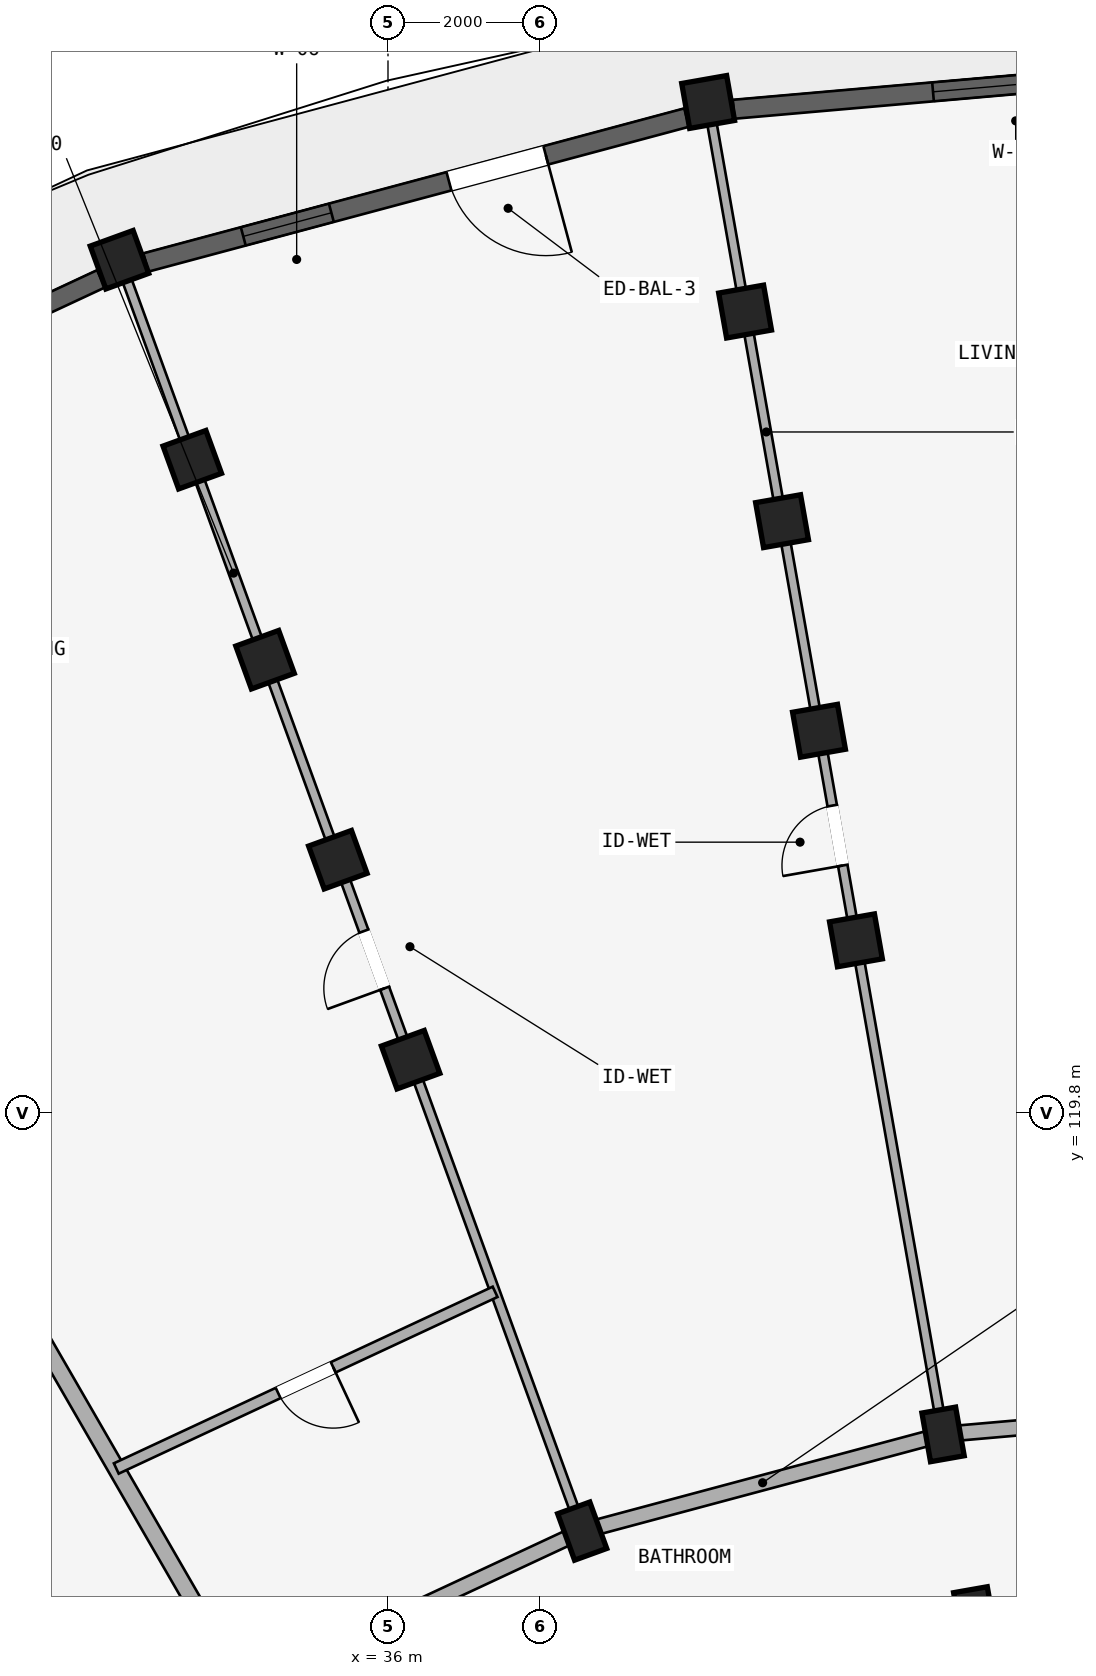
"""IFC4 building model, lengths in metres.
Left out: names, types, materials, properties, quantities, classifications, styles, units other than length and angle.
Written with IfcOpenShell. Run it as: python <this file> out.ifc"""

import sys

from ifc_helpers import new_model, si_unit, direction, frame, frame_2d, origin, origin_2d, place, context, subcontext, project, spatial, rectangle, extrude, element, fill, save


model = new_model("IFC4")
c1 = context("Model", 3, precision=1e-05, world=origin(), true_north=direction((0.0, 1.0)))
c2 = subcontext(c1, "Body", "Model", "MODEL_VIEW")
j1 = project(units=[si_unit("LENGTHUNIT", "METRE"), si_unit("PLANEANGLEUNIT", "RADIAN")], contexts=[c1])
p1 = place(None, origin())
s1 = spatial("IfcSite", under=j1, at=p1, CompositionType="ELEMENT")
p2 = place(p1, origin())
s2 = spatial("IfcBuilding", under=s1, at=p2, CompositionType="ELEMENT")
p3 = place(p2, frame((0.0, 0.0, 33.9)))
s3 = spatial("IfcBuildingStorey", under=s2, at=p3, CompositionType="ELEMENT", Elevation=33.9)
for number, where, z_axis, x_axis in (
    (1, (43.72, 113.208, 0.0), (0.0, 0.0, 1.0), (0.985, 0.174, 0.0)),
    (2, (43.303, 115.572, 0.0), (0.0, 0.0, 1.0), (0.985, 0.174, 0.0)),
):
    element("IfcColumn", number, at=place(p3, frame(where, z_axis=z_axis, x_axis=x_axis)), inside=s3, PredefinedType="COLUMN", context=c2, shape_type="SweptSolid", body=[
        extrude(rectangle(XDim=0.45, YDim=0.65, at=origin_2d()), origin(), (0.0, 0.0, 1.0), 2.93),
    ])
for number, where, z_axis, x_axis in (
    (3, (42.157, 122.071, 0.0), (0.0, 0.0, 1.0), (0.985, 0.174, 0.0)),
    (4, (41.671, 124.829, 0.0), (0.0, 0.0, 1.0), (0.985, 0.174, 0.0)),
    (5, (41.185, 127.586, 0.0), (0.0, 0.0, 1.0), (0.985, 0.174, 0.0)),
    (6, (40.698, 130.344, 0.0), (0.0, 0.0, 1.0), (0.985, 0.174, 0.0)),
    (7, (40.212, 133.101, 0.0), (0.0, 0.0, 1.0), (0.985, 0.174, 0.0)),
):
    element("IfcColumn", number, at=place(p3, frame(where, z_axis=z_axis, x_axis=x_axis)), inside=s3, PredefinedType="COLUMN", context=c2, shape_type="SweptSolid", body=[
        extrude(rectangle(XDim=0.6, YDim=0.6, at=origin_2d()), origin(), (0.0, 0.0, 1.0), 2.93),
    ])
p4 = place(p3, frame((38.555, 114.299, 0.0), z_axis=(0.0, 0.0, 1.0), x_axis=(0.939692620786, 0.342020143326, 0.0)))
e8 = element("IfcColumn", 8, at=p4, inside=s3, PredefinedType="COLUMN", context=c2, shape_type="SweptSolid", body=[
    extrude(rectangle(XDim=0.45, YDim=0.65, at=origin_2d()), origin(), (0.0, 0.0, 1.0), 2.93),
])
for number, where, z_axis, x_axis in (
    (9, (36.298, 120.501, 0.0), (0.0, 0.0, 1.0), (0.94, 0.342, 0.0)),
    (10, (35.34, 123.132, 0.0), (0.0, 0.0, 1.0), (0.94, 0.342, 0.0)),
    (11, (34.382, 125.764, 0.0), (0.0, 0.0, 1.0), (0.94, 0.342, 0.0)),
    (12, (33.425, 128.395, 0.0), (0.0, 0.0, 1.0), (0.94, 0.342, 0.0)),
    (13, (32.467, 131.026, 0.0), (0.0, 0.0, 1.0), (0.94, 0.342, 0.0)),
):
    element("IfcColumn", number, at=place(p3, frame(where, z_axis=z_axis, x_axis=x_axis)), inside=s3, PredefinedType="COLUMN", context=c2, shape_type="SweptSolid", body=[
        extrude(rectangle(XDim=0.6, YDim=0.6, at=origin_2d()), origin(), (0.0, 0.0, 1.0), 2.93),
    ])
p5 = place(p3, frame((48.2, 113.6, 0.0), z_axis=(0.0, 0.0, 1.0), x_axis=(-0.996191949488, -0.087187153726, 0.0)))
e14 = element("IfcWall", 14, at=p5, inside=s3, PredefinedType="STANDARD", context=c2, shape_type="SweptSolid", body=[
    extrude(rectangle(XDim=4.497, YDim=0.2, at=frame_2d((2.249, 0.0))), origin(), (0.0, 0.0, 1.0), 2.372),
])
p6 = place(p5, frame((1.729, 0.0, 0.0)))
e15 = element("IfcOpeningElement", 15, at=p6, cuts=e14, PredefinedType="OPENING", context=c2, shape_type="SweptSolid", body=[
    extrude(rectangle(XDim=1.04, YDim=2.15, at=frame_2d((0.52, 1.075))), frame((0.0, 0.11, 0.0), z_axis=(0.0, -1.0, 0.0), x_axis=(1.0, 0.0, 0.0)), (0.0, 0.0, 1.0), 0.22),
])
p7 = place(p3, frame((48.2, 116.0, 0.0), z_axis=(0.0, 0.0, 1.0), x_axis=(-0.996193663584, -0.087167566415, 0.0)))
e16 = element("IfcWall", 16, at=p7, inside=s3, PredefinedType="STANDARD", context=c2, shape_type="SweptSolid", body=[
    extrude(rectangle(XDim=4.916, YDim=0.2, at=frame_2d((2.458, 0.0))), origin(), (0.0, 0.0, 1.0), 2.372),
])
p8 = place(p7, frame((1.958, 0.0, 0.0)))
e17 = element("IfcOpeningElement", 17, at=p8, cuts=e16, PredefinedType="OPENING", context=c2, shape_type="SweptSolid", body=[
    extrude(rectangle(XDim=1.0, YDim=2.15, at=frame_2d((0.5, 1.075))), frame((0.0, 0.11, 0.0), z_axis=(0.0, -1.0, 0.0), x_axis=(1.0, 0.0, 0.0)), (0.0, 0.0, 1.0), 0.22),
])
p9 = place(p3, frame((43.303, 115.572, 0.0), z_axis=(0.0, 0.0, 1.0), x_axis=(-0.965930095386, -0.258803112091, 0.0)))
e18 = element("IfcWall", 18, at=p9, inside=s3, PredefinedType="STANDARD", context=c2, shape_type="SweptSolid", body=[
    extrude(rectangle(XDim=4.916, YDim=0.2, at=frame_2d((2.458, 0.0))), origin(), (0.0, 0.0, 1.0), 2.372),
])
p10 = place(p3, frame((38.555, 114.299, 0.0), z_axis=(0.0, 0.0, 1.0), x_axis=(-0.906302381024, -0.422629854778, 0.0)))
e19 = element("IfcWall", 19, at=p10, inside=s3, PredefinedType="STANDARD", context=c2, shape_type="SweptSolid", body=[
    extrude(rectangle(XDim=4.915, YDim=0.2, at=frame_2d((2.458, 0.0))), origin(), (0.0, 0.0, 1.0), 2.372),
])
p11 = place(p3, frame((43.286, 115.67, 0.0), z_axis=(0.0, 0.0, 1.0), x_axis=(-0.173646216546, 0.984808098809, 0.0)))
e20 = element("IfcWall", 20, at=p11, inside=s3, PredefinedType="PARTITIONING", context=c2, shape_type="SweptSolid", body=[
    extrude(rectangle(XDim=17.42, YDim=0.125, at=frame_2d((8.71, 0.0))), origin(), (0.0, 0.0, 1.0), 2.372),
])
p12 = place(p11, frame((7.5, 0.0, 0.0)))
e21 = element("IfcOpeningElement", 21, at=p12, cuts=e20, PredefinedType="OPENING", context=c2, shape_type="SweptSolid", body=[
    extrude(rectangle(XDim=0.8, YDim=2.1, at=frame_2d((0.4, 1.05))), frame((0.0, 0.073, 0.0), z_axis=(0.0, -1.0, 0.0), x_axis=(1.0, 0.0, 0.0)), (0.0, 0.0, 1.0), 0.145),
])
p13 = place(p3, frame((38.521, 114.393, 0.0), z_axis=(0.0, 0.0, 1.0), x_axis=(-0.342022120477, 0.939691901159, 0.0)))
e22 = element("IfcWall", 22, at=p13, inside=s3, PredefinedType="PARTITIONING", context=c2, shape_type="SweptSolid", body=[
    extrude(rectangle(XDim=17.42, YDim=0.125, at=frame_2d((8.71, 0.0))), origin(), (0.0, 0.0, 1.0), 2.372),
])
p14 = place(p13, frame((7.5, 0.0, 0.0)))
e23 = element("IfcOpeningElement", 23, at=p14, cuts=e22, PredefinedType="OPENING", context=c2, shape_type="SweptSolid", body=[
    extrude(rectangle(XDim=0.8, YDim=2.1, at=frame_2d((0.4, 1.05))), frame((0.0, 0.073, 0.0), z_axis=(0.0, -1.0, 0.0), x_axis=(1.0, 0.0, 0.0)), (0.0, 0.0, 1.0), 0.145),
])
p15 = place(p3, frame((34.05, 112.309, 0.0), z_axis=(0.0, 0.0, 1.0), x_axis=(-0.499997843263, 0.866026648973, 0.0)))
e24 = element("IfcWall", 24, at=p15, inside=s3, PredefinedType="STANDARD", context=c2, shape_type="SweptSolid", body=[
    extrude(rectangle(XDim=17.42, YDim=0.22, at=frame_2d((8.71, 0.0))), origin(), (0.0, 0.0, 1.0), 2.372),
])
p16 = place(p3, frame((37.409, 117.447, 0.0), z_axis=(0.0, 0.0, 1.0), x_axis=(-0.906302189986, -0.422630264446, 0.0)))
e25 = element("IfcWall", 25, at=p16, inside=s3, PredefinedType="PLUMBINGWALL", context=c2, shape_type="SweptSolid", body=[
    extrude(rectangle(XDim=5.5, YDim=0.15, at=frame_2d((2.75, 0.0))), origin(), (0.0, 0.0, 1.0), 2.372),
])
p17 = place(p16, frame((2.35, 0.0, 0.0)))
e26 = element("IfcOpeningElement", 26, at=p17, cuts=e25, PredefinedType="OPENING", context=c2, shape_type="SweptSolid", body=[
    extrude(rectangle(XDim=0.8, YDim=2.1, at=frame_2d((0.4, 1.05))), frame((0.0, 0.085, 0.0), z_axis=(0.0, -1.0, 0.0), x_axis=(1.0, 0.0, 0.0)), (0.0, 0.0, 1.0), 0.17),
])
p18 = place(p3, frame((47.886, 133.647, 0.0), z_axis=(0.0, 0.0, 1.0), x_axis=(-0.996197565379, -0.087122963287, 0.0)))
e27 = element("IfcWall", 27, at=p18, inside=s3, PredefinedType="STANDARD", context=c2, shape_type="SweptSolid", body=[
    extrude(rectangle(XDim=7.367, YDim=0.25, at=frame_2d((3.684, 0.0))), origin(), (0.0, 0.0, 1.0), 2.472),
])
p19 = place(p18, frame((2.634, 0.0, 0.472)))
e28 = element("IfcOpeningElement", 28, at=p19, cuts=e27, PredefinedType="OPENING", context=c2, shape_type="SweptSolid", body=[
    extrude(rectangle(XDim=2.1, YDim=1.8, at=frame_2d((1.05, 0.9))), frame((0.0, 0.135, 0.0), z_axis=(0.0, -1.0, 0.0), x_axis=(1.0, 0.0, 0.0)), (0.0, 0.0, 1.0), 0.27),
])
p20 = place(p3, frame((39.93, 132.896, 0.0), z_axis=(0.0, 0.0, 1.0), x_axis=(-0.965925122991, -0.258821669831, 0.0)))
e29 = element("IfcWall", 29, at=p20, inside=s3, PredefinedType="STANDARD", context=c2, shape_type="SweptSolid", body=[
    extrude(rectangle(XDim=7.367, YDim=0.25, at=frame_2d((3.684, 0.0))), origin(), (0.0, 0.0, 1.0), 2.472),
])
p21 = place(p20, frame((4.84, 0.0, 0.422)))
e30 = element("IfcOpeningElement", 30, at=p21, cuts=e29, PredefinedType="OPENING", context=c2, shape_type="SweptSolid", body=[
    extrude(rectangle(XDim=1.2, YDim=1.5, at=frame_2d((0.6, 0.75))), frame((0.0, 0.135, 0.0), z_axis=(0.0, -1.0, 0.0), x_axis=(1.0, 0.0, 0.0)), (0.0, 0.0, 1.0), 0.27),
])
p22 = place(p20, frame((1.918, 0.0, 0.0)))
e31 = element("IfcOpeningElement", 31, at=p22, cuts=e29, PredefinedType="OPENING", context=c2, shape_type="SweptSolid", body=[
    extrude(rectangle(XDim=1.32, YDim=2.15, at=frame_2d((0.66, 1.075))), frame((0.0, 0.135, 0.0), z_axis=(0.0, -1.0, 0.0), x_axis=(1.0, 0.0, 0.0)), (0.0, 0.0, 1.0), 0.27),
])
p23 = place(p3, frame((32.225, 130.775, 0.0), z_axis=(0.0, 0.0, 1.0), x_axis=(-0.906321090675, -0.422589730823, 0.0)))
e32 = element("IfcWall", 32, at=p23, inside=s3, PredefinedType="STANDARD", context=c2, shape_type="SweptSolid", body=[
    extrude(rectangle(XDim=7.367, YDim=0.25, at=frame_2d((3.684, 0.0))), origin(), (0.0, 0.0, 1.0), 2.472),
])
p24 = place(p23, frame((2.783, 0.0, 0.622)))
e33 = element("IfcOpeningElement", 33, at=p24, cuts=e32, PredefinedType="OPENING", context=c2, shape_type="SweptSolid", body=[
    extrude(rectangle(XDim=1.8, YDim=1.65, at=frame_2d((0.9, 0.825))), frame((0.0, 0.135, 0.0), z_axis=(0.0, -1.0, 0.0), x_axis=(1.0, 0.0, 0.0)), (0.0, 0.0, 1.0), 0.27),
])
p25 = place(p19, origin())
e34 = element("IfcWindow", 34, at=p25, inside=s3, PartitioningType="TRIPLE_PANEL_VERTICAL", PredefinedType="WINDOW", context=c2, shape_type="SweptSolid", body=[
    extrude(rectangle(XDim=2.1, YDim=1.8, at=frame_2d((1.05, 0.9))), frame((0.0, 0.03, 0.0), z_axis=(0.0, -1.0, 0.0), x_axis=(1.0, 0.0, 0.0)), (0.0, 0.0, 1.0), 0.06),
])
fill(e28, e34)
p26 = place(p21, origin())
e35 = element("IfcWindow", 35, at=p26, inside=s3, PartitioningType="SINGLE_PANEL", PredefinedType="WINDOW", context=c2, shape_type="SweptSolid", body=[
    extrude(rectangle(XDim=1.2, YDim=1.5, at=frame_2d((0.6, 0.75))), frame((0.0, 0.03, 0.0), z_axis=(0.0, -1.0, 0.0), x_axis=(1.0, 0.0, 0.0)), (0.0, 0.0, 1.0), 0.06),
])
fill(e30, e35)
p27 = place(p12, frame((0.8, 0.0, 0.0), z_axis=(0.0, 0.0, 1.0), x_axis=(-1.0, 0.0, 0.0)))
e36 = element("IfcDoor", 36, at=p27, inside=s3, OperationType="SINGLE_SWING_RIGHT", PredefinedType="DOOR", context=c2, shape_type="SweptSolid", body=[
    extrude(rectangle(XDim=0.8, YDim=2.1, at=frame_2d((0.4, 1.05))), frame((0.0, 0.025, 0.0), z_axis=(0.0, -1.0, 0.0), x_axis=(1.0, 0.0, 0.0)), (0.0, 0.0, 1.0), 0.05),
])
fill(e21, e36)
p28 = place(p14, origin())
e37 = element("IfcDoor", 37, at=p28, inside=s3, OperationType="SINGLE_SWING_LEFT", PredefinedType="DOOR", context=c2, shape_type="SweptSolid", body=[
    extrude(rectangle(XDim=0.8, YDim=2.1, at=frame_2d((0.4, 1.05))), frame((0.0, 0.025, 0.0), z_axis=(0.0, -1.0, 0.0), x_axis=(1.0, 0.0, 0.0)), (0.0, 0.0, 1.0), 0.05),
])
fill(e23, e37)
p29 = place(p17, frame((0.8, 0.0, 0.0), z_axis=(0.0, 0.0, 1.0), x_axis=(-1.0, 0.0, 0.0)))
e38 = element("IfcDoor", 38, at=p29, inside=s3, OperationType="SINGLE_SWING_RIGHT", PredefinedType="DOOR", context=c2, shape_type="SweptSolid", body=[
    extrude(rectangle(XDim=0.8, YDim=2.1, at=frame_2d((0.4, 1.05))), frame((0.0, 0.025, 0.0), z_axis=(0.0, -1.0, 0.0), x_axis=(1.0, 0.0, 0.0)), (0.0, 0.0, 1.0), 0.05),
])
fill(e26, e38)
p30 = place(p22, frame((1.32, 0.0, 0.0), z_axis=(0.0, 0.0, 1.0), x_axis=(-1.0, 0.0, 0.0)))
e39 = element("IfcDoor", 39, at=p30, inside=s3, OperationType="SINGLE_SWING_RIGHT", PredefinedType="DOOR", context=c2, shape_type="SweptSolid", body=[
    extrude(rectangle(XDim=1.32, YDim=2.15, at=frame_2d((0.66, 1.075))), frame((0.0, 0.025, 0.0), z_axis=(0.0, -1.0, 0.0), x_axis=(1.0, 0.0, 0.0)), (0.0, 0.0, 1.0), 0.05),
])
fill(e31, e39)
save(model, sys.argv[1])
